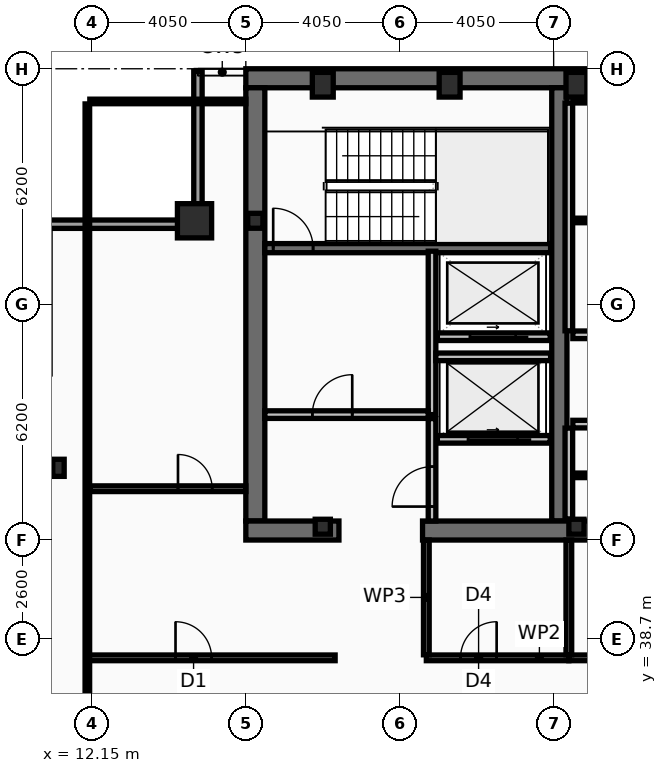
"""IFC4 building model, lengths in metres.
Left out: names, types, materials, properties, quantities, classifications, styles, units other than length and angle.
Written with IfcOpenShell. Run it as: python <this file> out.ifc"""

import sys

from ifc_helpers import new_model, si_unit, direction, frame, frame_2d, origin, origin_2d, place, context, subcontext, project, spatial, rectangle, hollow_rectangle, i_section, extrude, element, fill, save


model = new_model("IFC4")
c1 = context("Model", 3, precision=1e-05, world=origin(), true_north=direction((0.0, 1.0)))
c2 = subcontext(c1, "Body", "Model", "MODEL_VIEW")
j1 = project(units=[si_unit("LENGTHUNIT", "METRE"), si_unit("PLANEANGLEUNIT", "RADIAN")], contexts=[c1])
p1 = place(None, origin())
s1 = spatial("IfcSite", under=j1, at=p1, CompositionType="ELEMENT")
p2 = place(p1, origin())
s2 = spatial("IfcBuilding", under=s1, at=p2, CompositionType="ELEMENT")
p3 = place(p2, frame((0.0, 0.0, 318.2)))
s3 = spatial("IfcBuildingStorey", under=s2, at=p3, CompositionType="ELEMENT", Elevation=318.2)
p4 = place(p3, frame((16.2, 53.45, 0.0), z_axis=(0.0, 0.0, 1.0), x_axis=(1.0, 0.0, 0.0)))
e1 = element("IfcWall", 1, at=p4, inside=s3, PredefinedType="SHEAR", context=c2, shape_type="SweptSolid", body=[
    extrude(rectangle(XDim=40.5, YDim=0.5, at=frame_2d((20.25, 0.0))), origin(), (0.0, 0.0, 1.0), 3.44),
])
p5 = place(p3, frame((16.45, 41.8, 0.0), z_axis=(0.0, 0.0, 1.0), x_axis=(0.0, 1.0, 0.0)))
e2 = element("IfcWall", 2, at=p5, inside=s3, PredefinedType="SHEAR", context=c2, shape_type="SweptSolid", body=[
    extrude(rectangle(XDim=11.4, YDim=0.5, at=frame_2d((5.7, 0.0))), origin(), (0.0, 0.0, 1.0), 3.44),
])
p6 = place(p3, frame((24.45, 41.8, 0.0), z_axis=(0.0, 0.0, 1.0), x_axis=(0.0, 1.0, 0.0)))
e3 = element("IfcWall", 3, at=p6, inside=s3, PredefinedType="SHEAR", context=c2, shape_type="SweptSolid", body=[
    extrude(rectangle(XDim=11.4, YDim=0.4, at=frame_2d((5.7, 0.0))), origin(), (0.0, 0.0, 1.0), 3.44),
])
p7 = place(p3, frame((18.65, 41.55, 0.0), z_axis=(0.0, 0.0, 1.0), x_axis=(-1.0, 0.0, 0.0)))
e4 = element("IfcWall", 4, at=p7, inside=s3, PredefinedType="SHEAR", context=c2, shape_type="SweptSolid", body=[
    extrude(rectangle(XDim=2.45, YDim=0.5, at=frame_2d((1.225, 0.0))), origin(), (0.0, 0.0, 1.0), 3.44),
])
p8 = place(p3, frame((32.3, 41.55, 0.0), z_axis=(0.0, 0.0, 1.0), x_axis=(-1.0, 0.0, 0.0)))
e5 = element("IfcWall", 5, at=p8, inside=s3, PredefinedType="SHEAR", context=c2, shape_type="SweptSolid", body=[
    extrude(rectangle(XDim=11.45, YDim=0.5, at=frame_2d((5.725, 0.0))), origin(), (0.0, 0.0, 1.0), 3.44),
])
p9 = place(p3, frame((16.7, 48.98, 0.0), z_axis=(0.0, 0.0, 1.0), x_axis=(1.0, 0.0, 0.0)))
e6 = element("IfcWall", 6, at=p9, inside=s3, PredefinedType="SHEAR", context=c2, shape_type="SweptSolid", body=[
    extrude(rectangle(XDim=7.52, YDim=0.24, at=frame_2d((3.76, 0.0))), origin(), (0.0, 0.0, 1.0), 3.44),
])
p10 = place(p9, frame((0.22, 0.0, 0.0)))
e7 = element("IfcOpeningElement", 7, at=p10, cuts=e6, PredefinedType="OPENING", context=c2, shape_type="SweptSolid", body=[
    extrude(rectangle(XDim=1.05, YDim=2.15, at=frame_2d((0.525, 1.075))), frame((0.0, 0.13, 0.0), z_axis=(0.0, -1.0, 0.0), x_axis=(1.0, 0.0, 0.0)), (0.0, 0.0, 1.0), 0.26),
])
p11 = place(p3, frame((14.85, 49.7, 0.0), z_axis=(0.0, 0.0, 1.0), x_axis=(1.0, 0.0, 0.0)))
e8 = element("IfcColumn", 8, at=p11, inside=s3, PredefinedType="COLUMN", context=c2, shape_type="SweptSolid", body=[
    extrude(hollow_rectangle(XDim=0.9, YDim=0.9, WallThickness=0.05, at=origin_2d()), origin(), (0.0, 0.0, 1.0), 3.6),
])
for number, where, z_axis, x_axis in (
    (9, (18.225, 53.28, 0.0), (0.0, 0.0, 1.0), (1.0, 0.0, 0.0)),
    (10, (21.562, 53.28, 0.0), (0.0, 0.0, 1.0), (1.0, 0.0, 0.0)),
    (11, (24.9, 53.28, 0.0), (0.0, 0.0, 1.0), (1.0, 0.0, 0.0)),
):
    element("IfcColumn", number, at=place(p3, frame(where, z_axis=z_axis, x_axis=x_axis)), inside=s3, PredefinedType="COLUMN", context=c2, shape_type="SweptSolid", body=[
        extrude(hollow_rectangle(XDim=0.55, YDim=0.65, WallThickness=0.04, at=origin_2d()), origin(), (0.0, 0.0, 1.0), 3.6),
    ])
p12 = place(p3, frame((11.27, 43.2, 0.0), z_axis=(0.0, 0.0, 1.0), x_axis=(1.0, 0.0, 0.0)))
e12 = element("IfcColumn", 12, at=p12, inside=s3, PredefinedType="COLUMN", context=c2, shape_type="SweptSolid", body=[
    extrude(i_section(OverallWidth=0.3, OverallDepth=0.45, WebThickness=0.014, FlangeThickness=0.026, at=origin_2d()), origin(), (0.0, 0.0, 1.0), 3.6),
])
for number, where, z_axis, x_axis in (
    (13, (16.45, 49.7, 0.0), (0.0, 0.0, 1.0), (1.0, 0.0, 0.0)),
    (14, (18.225, 41.65, 0.0), (0.0, 0.0, 1.0), (1.0, 0.0, 0.0)),
    (15, (24.9, 41.65, 0.0), (0.0, 0.0, 1.0), (1.0, 0.0, 0.0)),
):
    element("IfcColumn", number, at=place(p3, frame(where, z_axis=z_axis, x_axis=x_axis)), inside=s3, PredefinedType="COLUMN", context=c2, shape_type="SweptSolid", body=[
        extrude(i_section(OverallWidth=0.399, OverallDepth=0.393, WebThickness=0.023, FlangeThickness=0.037, at=origin_2d()), origin(), (0.0, 0.0, 1.0), 3.6),
    ])
p13 = place(p3, frame((10.83, 49.61, 0.0), z_axis=(0.0, 0.0, 1.0), x_axis=(1.0, 0.0, 0.0)))
e16 = element("IfcWall", 16, at=p13, inside=s3, PredefinedType="SOLIDWALL", context=c2, shape_type="SweptSolid", body=[
    extrude(rectangle(XDim=4.22, YDim=0.22, at=frame_2d((2.11, 0.0))), origin(), (0.0, 0.0, 1.0), 2.88),
])
p14 = place(p3, frame((14.94, 49.72, 0.0), z_axis=(0.0, 0.0, 1.0), x_axis=(0.0, 1.0, 0.0)))
e17 = element("IfcWall", 17, at=p14, inside=s3, PredefinedType="SOLIDWALL", context=c2, shape_type="SweptSolid", body=[
    extrude(rectangle(XDim=3.91, YDim=0.22, at=frame_2d((1.955, 0.0))), origin(), (0.0, 0.0, 1.0), 2.88),
])
p15 = place(p3, frame((24.21, 43.95, 0.0), z_axis=(0.0, 0.0, 1.0), x_axis=(-1.0, 0.0, 0.0)))
e18 = element("IfcWall", 18, at=p15, inside=s3, PredefinedType="PARTITIONING", context=c2, shape_type="SweptSolid", body=[
    extrude(rectangle(XDim=2.97, YDim=0.2, at=frame_2d((1.485, 0.0))), origin(), (0.0, 0.0, 1.0), 3.44),
])
p16 = place(p15, frame((0.86, 0.0, 0.0)))
e19 = element("IfcOpeningElement", 19, at=p16, cuts=e18, PredefinedType="OPENING", context=c2, shape_type="SweptSolid", body=[
    extrude(rectangle(XDim=1.3, YDim=2.18, at=frame_2d((0.65, 1.09))), frame((0.0, 0.11, 0.0), z_axis=(0.0, -1.0, 0.0), x_axis=(1.0, 0.0, 0.0)), (0.0, 0.0, 1.0), 0.22),
])
p17 = place(p3, frame((24.21, 46.65, 0.0), z_axis=(0.0, 0.0, 1.0), x_axis=(-1.0, 0.0, 0.0)))
e20 = element("IfcWall", 20, at=p17, inside=s3, PredefinedType="PARTITIONING", context=c2, shape_type="SweptSolid", body=[
    extrude(rectangle(XDim=2.97, YDim=0.2, at=frame_2d((1.485, 0.0))), origin(), (0.0, 0.0, 1.0), 3.44),
])
p18 = place(p17, frame((0.91, 0.0, 0.0)))
e21 = element("IfcOpeningElement", 21, at=p18, cuts=e20, PredefinedType="OPENING", context=c2, shape_type="SweptSolid", body=[
    extrude(rectangle(XDim=1.2, YDim=2.18, at=frame_2d((0.6, 1.09))), frame((0.0, 0.11, 0.0), z_axis=(0.0, -1.0, 0.0), x_axis=(1.0, 0.0, 0.0)), (0.0, 0.0, 1.0), 0.22),
])
p19 = place(p3, frame((21.1, 44.6, 0.0), z_axis=(0.0, 0.0, 1.0), x_axis=(0.0, 1.0, 0.0)))
e22 = element("IfcWall", 22, at=p19, inside=s3, PredefinedType="PARTITIONING", context=c2, shape_type="SweptSolid", body=[
    extrude(rectangle(XDim=4.3, YDim=0.2, at=frame_2d((2.15, 0.0))), origin(), (0.0, 0.0, 1.0), 3.44),
])
p20 = place(p3, frame((16.7, 44.6, 0.0), z_axis=(0.0, 0.0, 1.0), x_axis=(1.0, 0.0, 0.0)))
e23 = element("IfcWall", 23, at=p20, inside=s3, PredefinedType="PARTITIONING", context=c2, shape_type="SweptSolid", body=[
    extrude(rectangle(XDim=4.3, YDim=0.2, at=frame_2d((2.15, 0.0))), origin(), (0.0, 0.0, 1.0), 3.44),
])
p21 = place(p20, frame((1.25, 0.0, 0.0)))
e24 = element("IfcOpeningElement", 24, at=p21, cuts=e23, PredefinedType="OPENING", context=c2, shape_type="SweptSolid", body=[
    extrude(rectangle(XDim=1.05, YDim=2.15, at=frame_2d((0.525, 1.075))), frame((0.0, 0.11, 0.0), z_axis=(0.0, -1.0, 0.0), x_axis=(1.0, 0.0, 0.0)), (0.0, 0.0, 1.0), 0.22),
])
p22 = place(p3, frame((21.2, 46.12, 0.0), z_axis=(0.0, 0.0, 1.0), x_axis=(1.0, 0.0, 0.0)))
e25 = element("IfcWall", 25, at=p22, inside=s3, PredefinedType="PARTITIONING", context=c2, shape_type="SweptSolid", body=[
    extrude(rectangle(XDim=3.02, YDim=0.2, at=frame_2d((1.51, 0.0))), origin(), (0.0, 0.0, 1.0), 3.44),
])
p23 = place(p3, frame((21.1, 41.8, 0.0), z_axis=(0.0, 0.0, 1.0), x_axis=(0.0, 1.0, 0.0)))
e26 = element("IfcWall", 26, at=p23, inside=s3, PredefinedType="PARTITIONING", context=c2, shape_type="SweptSolid", body=[
    extrude(rectangle(XDim=2.695, YDim=0.2, at=frame_2d((1.348, 0.0))), origin(), (0.0, 0.0, 1.0), 3.44),
])
p24 = place(p23, frame((0.38, 0.0, 0.0)))
e27 = element("IfcOpeningElement", 27, at=p24, cuts=e26, PredefinedType="OPENING", context=c2, shape_type="SweptSolid", body=[
    extrude(rectangle(XDim=1.05, YDim=2.15, at=frame_2d((0.525, 1.075))), frame((0.0, 0.11, 0.0), z_axis=(0.0, -1.0, 0.0), x_axis=(1.0, 0.0, 0.0)), (0.0, 0.0, 1.0), 0.22),
])
p25 = place(p3, frame((24.7, 46.805, 0.0), z_axis=(0.0, 0.0, 1.0), x_axis=(0.0, 1.0, 0.0)))
e28 = element("IfcWall", 28, at=p25, inside=s3, PredefinedType="PARTITIONING", context=c2, shape_type="SweptSolid", body=[
    extrude(rectangle(XDim=5.99, YDim=0.2, at=frame_2d((2.995, 0.0))), origin(), (0.0, 0.0, 1.0), 3.44),
])
p26 = place(p3, frame((24.805, 52.86, 0.0), z_axis=(0.0, 0.0, 1.0), x_axis=(1.0, 0.0, 0.0)))
e29 = element("IfcWall", 29, at=p26, inside=s3, PredefinedType="PARTITIONING", context=c2, shape_type="SweptSolid", body=[
    extrude(rectangle(XDim=7.51, YDim=0.12, at=frame_2d((3.755, 0.0))), origin(), (0.0, 0.0, 1.0), 3.44),
])
p27 = place(p3, frame((24.805, 49.709, 0.0), z_axis=(0.0, 0.0, 1.0), x_axis=(1.0, 0.0, 0.0)))
e30 = element("IfcWall", 30, at=p27, inside=s3, PredefinedType="PARTITIONING", context=c2, shape_type="SweptSolid", body=[
    extrude(rectangle(XDim=7.51, YDim=0.12, at=frame_2d((3.755, 0.0))), origin(), (0.0, 0.0, 1.0), 3.44),
])
p28 = place(p27, frame((2.4, 0.0, 0.0)))
e31 = element("IfcOpeningElement", 31, at=p28, cuts=e30, PredefinedType="OPENING", context=c2, shape_type="SweptSolid", body=[
    extrude(rectangle(XDim=0.9, YDim=2.05, at=frame_2d((0.45, 1.025))), frame((0.0, 0.07, 0.0), z_axis=(0.0, -1.0, 0.0), x_axis=(1.0, 0.0, 0.0)), (0.0, 0.0, 1.0), 0.14),
])
p29 = place(p3, frame((24.805, 46.7, 0.0), z_axis=(0.0, 0.0, 1.0), x_axis=(1.0, 0.0, 0.0)))
e32 = element("IfcWall", 32, at=p29, inside=s3, PredefinedType="PARTITIONING", context=c2, shape_type="SweptSolid", body=[
    extrude(rectangle(XDim=7.51, YDim=0.2, at=frame_2d((3.755, 0.0))), origin(), (0.0, 0.0, 1.0), 3.44),
])
p30 = place(p29, frame((2.4, 0.0, 0.0)))
e33 = element("IfcOpeningElement", 33, at=p30, cuts=e32, PredefinedType="OPENING", context=c2, shape_type="SweptSolid", body=[
    extrude(rectangle(XDim=0.95, YDim=2.1, at=frame_2d((0.475, 1.05))), frame((0.0, 0.11, 0.0), z_axis=(0.0, -1.0, 0.0), x_axis=(1.0, 0.0, 0.0)), (0.0, 0.0, 1.0), 0.22),
])
p31 = place(p3, frame((24.7, 41.85, 0.0), z_axis=(0.0, 0.0, 1.0), x_axis=(0.0, 1.0, 0.0)))
e34 = element("IfcWall", 34, at=p31, inside=s3, PredefinedType="PARTITIONING", context=c2, shape_type="SweptSolid", body=[
    extrude(rectangle(XDim=2.395, YDim=0.2, at=frame_2d((1.198, 0.0))), origin(), (0.0, 0.0, 1.0), 3.44),
])
p32 = place(p3, frame((24.805, 43.002, 0.0), z_axis=(0.0, 0.0, 1.0), x_axis=(1.0, 0.0, 0.0)))
e35 = element("IfcWall", 35, at=p32, inside=s3, PredefinedType="PARTITIONING", context=c2, shape_type="SweptSolid", body=[
    extrude(rectangle(XDim=7.34, YDim=0.12, at=frame_2d((3.67, 0.0))), origin(), (0.0, 0.0, 1.0), 3.44),
])
p33 = place(p32, frame((2.4, 0.0, 0.0)))
e36 = element("IfcOpeningElement", 36, at=p33, cuts=e35, PredefinedType="OPENING", context=c2, shape_type="SweptSolid", body=[
    extrude(rectangle(XDim=0.9, YDim=2.05, at=frame_2d((0.45, 1.025))), frame((0.0, 0.07, 0.0), z_axis=(0.0, -1.0, 0.0), x_axis=(1.0, 0.0, 0.0)), (0.0, 0.0, 1.0), 0.14),
])
p34 = place(p3, frame((24.805, 44.35, 0.0), z_axis=(0.0, 0.0, 1.0), x_axis=(1.0, 0.0, 0.0)))
e37 = element("IfcWall", 37, at=p34, inside=s3, PredefinedType="PARTITIONING", context=c2, shape_type="SweptSolid", body=[
    extrude(rectangle(XDim=7.34, YDim=0.2, at=frame_2d((3.67, 0.0))), origin(), (0.0, 0.0, 1.0), 3.44),
])
p35 = place(p34, frame((2.4, 0.0, 0.0)))
e38 = element("IfcOpeningElement", 38, at=p35, cuts=e37, PredefinedType="OPENING", context=c2, shape_type="SweptSolid", body=[
    extrude(rectangle(XDim=0.95, YDim=2.1, at=frame_2d((0.475, 1.05))), frame((0.0, 0.11, 0.0), z_axis=(0.0, -1.0, 0.0), x_axis=(1.0, 0.0, 0.0)), (0.0, 0.0, 1.0), 0.22),
])
p36 = place(p3, frame((20.95, 38.2, 0.0), z_axis=(0.0, 0.0, 1.0), x_axis=(1.0, 0.0, 0.0)))
e39 = element("IfcWall", 39, at=p36, inside=s3, PredefinedType="PARTITIONING", context=c2, shape_type="SweptSolid", body=[
    extrude(rectangle(XDim=3.75, YDim=0.15, at=frame_2d((1.875, 0.0))), origin(), (0.0, 0.0, 1.0), 2.83),
])
p37 = place(p36, frame((0.9, 0.0, 0.0)))
e40 = element("IfcOpeningElement", 40, at=p37, cuts=e39, PredefinedType="OPENING", context=c2, shape_type="SweptSolid", body=[
    extrude(rectangle(XDim=0.95, YDim=2.05, at=frame_2d((0.475, 1.025))), frame((0.0, 0.085, 0.0), z_axis=(0.0, -1.0, 0.0), x_axis=(1.0, 0.0, 0.0)), (0.0, 0.0, 1.0), 0.17),
])
p38 = place(p3, frame((24.7, 38.2, 0.0), z_axis=(0.0, 0.0, 1.0), x_axis=(1.0, 0.0, 0.0)))
e41 = element("IfcWall", 41, at=p38, inside=s3, PredefinedType="PARTITIONING", context=c2, shape_type="SweptSolid", body=[
    extrude(rectangle(XDim=3.7, YDim=0.15, at=frame_2d((1.85, 0.0))), origin(), (0.0, 0.0, 1.0), 2.83),
])
p39 = place(p38, frame((0.9, 0.0, 0.0)))
e42 = element("IfcOpeningElement", 42, at=p39, cuts=e41, PredefinedType="OPENING", context=c2, shape_type="SweptSolid", body=[
    extrude(rectangle(XDim=0.95, YDim=2.05, at=frame_2d((0.475, 1.025))), frame((0.0, 0.085, 0.0), z_axis=(0.0, -1.0, 0.0), x_axis=(1.0, 0.0, 0.0)), (0.0, 0.0, 1.0), 0.17),
])
p40 = place(p3, frame((20.95, 38.28, 0.0), z_axis=(0.0, 0.0, 1.0), x_axis=(0.0, 1.0, 0.0)))
e43 = element("IfcWall", 43, at=p40, inside=s3, PredefinedType="PARTITIONING", context=c2, shape_type="SweptSolid", body=[
    extrude(rectangle(XDim=3.02, YDim=0.15, at=frame_2d((1.51, 0.0))), origin(), (0.0, 0.0, 1.0), 3.44),
])
p41 = place(p3, frame((24.7, 38.28, 0.0), z_axis=(0.0, 0.0, 1.0), x_axis=(0.0, 1.0, 0.0)))
e44 = element("IfcWall", 44, at=p41, inside=s3, PredefinedType="PARTITIONING", context=c2, shape_type="SweptSolid", body=[
    extrude(rectangle(XDim=3.02, YDim=0.15, at=frame_2d((1.51, 0.0))), origin(), (0.0, 0.0, 1.0), 2.83),
])
p42 = place(p3, frame((12.03, 38.2, 0.0), z_axis=(0.0, 0.0, 1.0), x_axis=(1.0, 0.0, 0.0)))
e45 = element("IfcWall", 45, at=p42, inside=s3, PredefinedType="PARTITIONING", context=c2, shape_type="SweptSolid", body=[
    extrude(rectangle(XDim=6.52, YDim=0.15, at=frame_2d((3.26, 0.0))), origin(), (0.0, 0.0, 1.0), 2.83),
])
p43 = place(p42, frame((2.32, 0.0, 0.0)))
e46 = element("IfcOpeningElement", 46, at=p43, cuts=e45, PredefinedType="OPENING", context=c2, shape_type="SweptSolid", body=[
    extrude(rectangle(XDim=0.95, YDim=2.05, at=frame_2d((0.475, 1.025))), frame((0.0, 0.085, 0.0), z_axis=(0.0, -1.0, 0.0), x_axis=(1.0, 0.0, 0.0)), (0.0, 0.0, 1.0), 0.17),
])
p44 = place(p3, frame((12.095, 42.65, 0.0), z_axis=(0.0, 0.0, 1.0), x_axis=(1.0, 0.0, 0.0)))
e47 = element("IfcWall", 47, at=p44, inside=s3, PredefinedType="PARTITIONING", context=c2, shape_type="SweptSolid", body=[
    extrude(rectangle(XDim=4.105, YDim=0.15, at=frame_2d((2.052, 0.0))), origin(), (0.0, 0.0, 1.0), 2.83),
])
p45 = place(p44, frame((2.32, 0.0, 0.0)))
e48 = element("IfcOpeningElement", 48, at=p45, cuts=e47, PredefinedType="OPENING", context=c2, shape_type="SweptSolid", body=[
    extrude(rectangle(XDim=0.9, YDim=2.05, at=frame_2d((0.45, 1.025))), frame((0.0, 0.085, 0.0), z_axis=(0.0, -1.0, 0.0), x_axis=(1.0, 0.0, 0.0)), (0.0, 0.0, 1.0), 0.17),
])
p46 = place(p3, frame((12.03, 10.665, 0.0), z_axis=(0.0, 0.0, 1.0), x_axis=(0.0, 1.0, 0.0)))
e49 = element("IfcWall", 49, at=p46, inside=s3, PredefinedType="PARTITIONING", context=c2, shape_type="SweptSolid", body=[
    extrude(rectangle(XDim=42.11, YDim=0.12, at=frame_2d((21.055, 0.0))), origin(), (0.0, 0.0, 1.0), 2.83),
])
p47 = place(p3, frame((12.095, 52.84, 0.0), z_axis=(0.0, 0.0, 1.0), x_axis=(1.0, 0.0, 0.0)))
e50 = element("IfcWall", 50, at=p47, inside=s3, PredefinedType="PARTITIONING", context=c2, shape_type="SweptSolid", body=[
    extrude(rectangle(XDim=4.105, YDim=0.12, at=frame_2d((2.052, 0.0))), origin(), (0.0, 0.0, 1.0), 3.44),
])
p48 = place(p10, origin())
e51 = element("IfcDoor", 51, at=p48, inside=s3, OperationType="SINGLE_SWING_LEFT", PredefinedType="DOOR", context=c2, shape_type="SweptSolid", body=[
    extrude(rectangle(XDim=1.05, YDim=2.15, at=frame_2d((0.525, 1.075))), frame((0.0, 0.025, 0.0), z_axis=(0.0, -1.0, 0.0), x_axis=(1.0, 0.0, 0.0)), (0.0, 0.0, 1.0), 0.05),
])
fill(e7, e51)
p49 = place(p16, origin())
e52 = element("IfcDoor", 52, at=p49, inside=s3, OperationType="SLIDING_TO_LEFT", PredefinedType="DOOR", context=c2, shape_type="SweptSolid", body=[
    extrude(rectangle(XDim=1.3, YDim=2.18, at=frame_2d((0.65, 1.09))), frame((0.0, 0.025, 0.0), z_axis=(0.0, -1.0, 0.0), x_axis=(1.0, 0.0, 0.0)), (0.0, 0.0, 1.0), 0.05),
])
fill(e19, e52)
p50 = place(p18, origin())
e53 = element("IfcDoor", 53, at=p50, inside=s3, OperationType="SLIDING_TO_LEFT", PredefinedType="DOOR", context=c2, shape_type="SweptSolid", body=[
    extrude(rectangle(XDim=1.2, YDim=2.18, at=frame_2d((0.6, 1.09))), frame((0.0, 0.025, 0.0), z_axis=(0.0, -1.0, 0.0), x_axis=(1.0, 0.0, 0.0)), (0.0, 0.0, 1.0), 0.05),
])
fill(e21, e53)
p51 = place(p21, origin())
e54 = element("IfcDoor", 54, at=p51, inside=s3, OperationType="SINGLE_SWING_RIGHT", PredefinedType="DOOR", context=c2, shape_type="SweptSolid", body=[
    extrude(rectangle(XDim=1.05, YDim=2.15, at=frame_2d((0.525, 1.075))), frame((0.0, 0.025, 0.0), z_axis=(0.0, -1.0, 0.0), x_axis=(1.0, 0.0, 0.0)), (0.0, 0.0, 1.0), 0.05),
])
fill(e24, e54)
p52 = place(p24, origin())
e55 = element("IfcDoor", 55, at=p52, inside=s3, OperationType="SINGLE_SWING_LEFT", PredefinedType="DOOR", context=c2, shape_type="SweptSolid", body=[
    extrude(rectangle(XDim=1.05, YDim=2.15, at=frame_2d((0.525, 1.075))), frame((0.0, 0.025, 0.0), z_axis=(0.0, -1.0, 0.0), x_axis=(1.0, 0.0, 0.0)), (0.0, 0.0, 1.0), 0.05),
])
fill(e27, e55)
p53 = place(p37, origin())
e56 = element("IfcDoor", 56, at=p53, inside=s3, OperationType="SINGLE_SWING_RIGHT", PredefinedType="DOOR", context=c2, shape_type="SweptSolid", body=[
    extrude(rectangle(XDim=0.95, YDim=2.05, at=frame_2d((0.475, 1.025))), frame((0.0, 0.025, 0.0), z_axis=(0.0, -1.0, 0.0), x_axis=(1.0, 0.0, 0.0)), (0.0, 0.0, 1.0), 0.05),
])
fill(e40, e56)
p54 = place(p43, origin())
e57 = element("IfcDoor", 57, at=p54, inside=s3, OperationType="SINGLE_SWING_LEFT", PredefinedType="DOOR", context=c2, shape_type="SweptSolid", body=[
    extrude(rectangle(XDim=0.95, YDim=2.05, at=frame_2d((0.475, 1.025))), frame((0.0, 0.025, 0.0), z_axis=(0.0, -1.0, 0.0), x_axis=(1.0, 0.0, 0.0)), (0.0, 0.0, 1.0), 0.05),
])
fill(e46, e57)
p55 = place(p45, origin())
e58 = element("IfcDoor", 58, at=p55, inside=s3, OperationType="SINGLE_SWING_LEFT", PredefinedType="DOOR", context=c2, shape_type="SweptSolid", body=[
    extrude(rectangle(XDim=0.9, YDim=2.05, at=frame_2d((0.45, 1.025))), frame((0.0, 0.025, 0.0), z_axis=(0.0, -1.0, 0.0), x_axis=(1.0, 0.0, 0.0)), (0.0, 0.0, 1.0), 0.05),
])
fill(e48, e58)
save(model, sys.argv[1])
